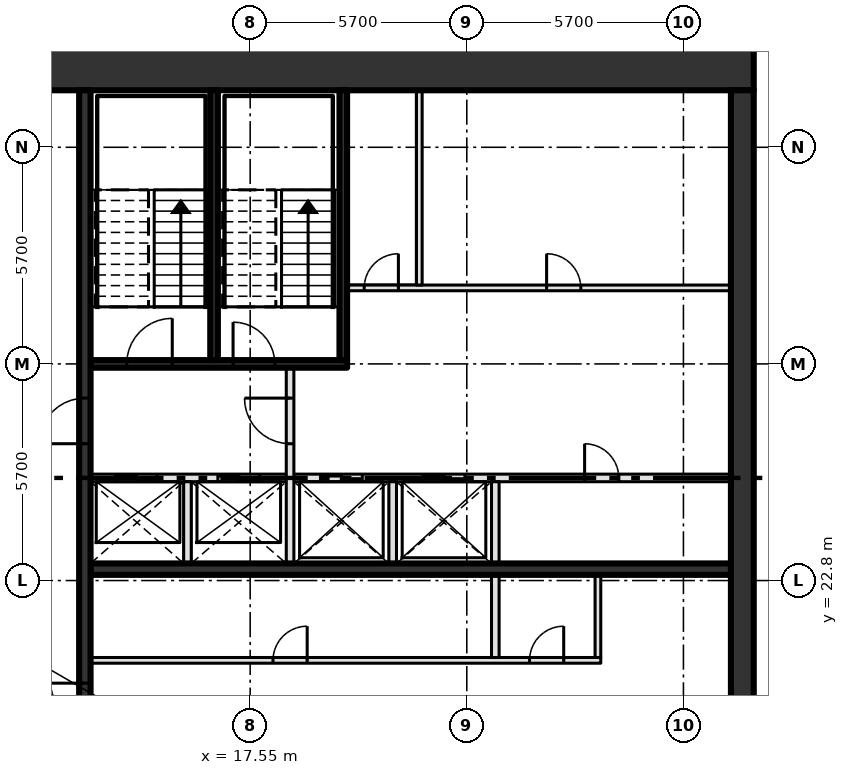
"""IFC4 building model, lengths in metres.
Left out: names, types, materials, properties, quantities, classifications, styles, units other than length and angle.
Written with IfcOpenShell. Run it as: python <this file> out.ifc"""

import sys

from ifc_helpers import new_model, si_unit, direction, frame, frame_2d, origin, place, context, subcontext, project, spatial, rectangle, extrude, element, fill, save


model = new_model("IFC4")
c1 = context("Model", 3, precision=1e-05, world=origin(), true_north=direction((0.0, 1.0)))
c2 = subcontext(c1, "Body", "Model", "MODEL_VIEW")
j1 = project(units=[si_unit("LENGTHUNIT", "METRE"), si_unit("PLANEANGLEUNIT", "RADIAN")], contexts=[c1])
p1 = place(None, origin())
s1 = spatial("IfcSite", under=j1, at=p1, CompositionType="ELEMENT")
p2 = place(p1, origin())
s2 = spatial("IfcBuilding", under=s1, at=p2, CompositionType="ELEMENT")
p3 = place(p2, frame((0.0, 0.0, 340.2)))
s3 = spatial("IfcBuildingStorey", under=s2, at=p3, CompositionType="ELEMENT", Elevation=340.2)
p4 = place(p3, frame((8.0, 36.3, -0.3), z_axis=(0.0, 0.0, 1.0), x_axis=(1.0, 0.0, 0.0)))
e1 = element("IfcWall", 1, at=p4, inside=s3, PredefinedType="SHEAR", context=c2, shape_type="SweptSolid", body=[
    extrude(rectangle(XDim=22.8, YDim=1.2, at=frame_2d((11.4, 0.0))), origin(), (0.0, 0.0, 1.0), 4.2),
])
p5 = place(p4, frame((2.3, 0.0, 0.3)))
e2 = element("IfcOpeningElement", 2, at=p5, cuts=e1, PredefinedType="OPENING", context=c2, shape_type="SweptSolid", body=[
    extrude(rectangle(XDim=1.8, YDim=2.1, at=frame_2d((0.9, 1.05))), frame((0.0, 0.61, 0.0), z_axis=(0.0, -1.0, 0.0), x_axis=(1.0, 0.0, 0.0)), (0.0, 0.0, 1.0), 1.22),
])
p6 = place(p3, frame((30.5, 14.7, -0.3), z_axis=(0.0, 0.0, 1.0), x_axis=(0.0, 1.0, 0.0)))
e3 = element("IfcWall", 3, at=p6, inside=s3, PredefinedType="SHEAR", context=c2, shape_type="SweptSolid", body=[
    extrude(rectangle(XDim=21.0, YDim=0.6, at=frame_2d((10.5, 0.0))), origin(), (0.0, 0.0, 1.0), 4.2),
])
p7 = place(p3, frame((13.35, 20.7, 0.0), z_axis=(0.0, 0.0, 1.0), x_axis=(1.0, 0.0, 0.0)))
e4 = element("IfcWall", 4, at=p7, inside=s3, PredefinedType="PARTITIONING", context=c2, shape_type="SweptSolid", body=[
    extrude(rectangle(XDim=13.425, YDim=0.15, at=frame_2d((6.712, 0.0))), origin(), (0.0, 0.0, 1.0), 3.9),
])
p8 = place(p7, frame((4.8, 0.0, 0.0)))
e5 = element("IfcOpeningElement", 5, at=p8, cuts=e4, PredefinedType="OPENING", context=c2, shape_type="SweptSolid", body=[
    extrude(rectangle(XDim=0.9, YDim=2.1, at=frame_2d((0.45, 1.05))), frame((0.0, 0.085, 0.0), z_axis=(0.0, -1.0, 0.0), x_axis=(1.0, 0.0, 0.0)), (0.0, 0.0, 1.0), 0.17),
])
p9 = place(p7, frame((11.55, 0.0, 0.0)))
e6 = element("IfcOpeningElement", 6, at=p9, cuts=e4, PredefinedType="OPENING", context=c2, shape_type="SweptSolid", body=[
    extrude(rectangle(XDim=0.9, YDim=2.1, at=frame_2d((0.45, 1.05))), frame((0.0, 0.085, 0.0), z_axis=(0.0, -1.0, 0.0), x_axis=(1.0, 0.0, 0.0)), (0.0, 0.0, 1.0), 0.17),
])
p10 = place(p3, frame((13.35, 23.1, 0.0), z_axis=(0.0, 0.0, 1.0), x_axis=(1.0, 0.0, 0.0)))
e7 = element("IfcWall", 7, at=p10, inside=s3, PredefinedType="SHEAR", context=c2, shape_type="SweptSolid", body=[
    extrude(rectangle(XDim=16.85, YDim=0.3, at=frame_2d((8.425, 0.0))), origin(), (0.0, 0.0, 1.0), 3.9),
])
p11 = place(p3, frame((13.35, 25.5, 0.0), z_axis=(0.0, 0.0, 1.0), x_axis=(1.0, 0.0, 0.0)))
e8 = element("IfcWall", 8, at=p11, inside=s3, PredefinedType="SOLIDWALL", context=c2, shape_type="SweptSolid", body=[
    extrude(rectangle(XDim=16.85, YDim=0.2, at=frame_2d((8.425, 0.0))), origin(), (0.0, 0.0, 1.0), 3.9),
])
p12 = place(p11, frame((0.65, 0.0, 0.0)))
e9 = element("IfcOpeningElement", 9, at=p12, cuts=e8, PredefinedType="OPENING", context=c2, shape_type="SweptSolid", body=[
    extrude(rectangle(XDim=1.1, YDim=2.1, at=frame_2d((0.55, 1.05))), frame((0.0, 0.11, 0.0), z_axis=(0.0, -1.0, 0.0), x_axis=(1.0, 0.0, 0.0)), (0.0, 0.0, 1.0), 0.22),
])
p13 = place(p11, frame((3.35, 0.0, 0.0)))
e10 = element("IfcOpeningElement", 10, at=p13, cuts=e8, PredefinedType="OPENING", context=c2, shape_type="SweptSolid", body=[
    extrude(rectangle(XDim=1.1, YDim=2.1, at=frame_2d((0.55, 1.05))), frame((0.0, 0.11, 0.0), z_axis=(0.0, -1.0, 0.0), x_axis=(1.0, 0.0, 0.0)), (0.0, 0.0, 1.0), 0.22),
])
p14 = place(p11, frame((6.05, 0.0, 0.0)))
e11 = element("IfcOpeningElement", 11, at=p14, cuts=e8, PredefinedType="OPENING", context=c2, shape_type="SweptSolid", body=[
    extrude(rectangle(XDim=1.1, YDim=2.1, at=frame_2d((0.55, 1.05))), frame((0.0, 0.11, 0.0), z_axis=(0.0, -1.0, 0.0), x_axis=(1.0, 0.0, 0.0)), (0.0, 0.0, 1.0), 0.22),
])
p15 = place(p11, frame((8.75, 0.0, 0.0)))
e12 = element("IfcOpeningElement", 12, at=p15, cuts=e8, PredefinedType="OPENING", context=c2, shape_type="SweptSolid", body=[
    extrude(rectangle(XDim=1.1, YDim=2.1, at=frame_2d((0.55, 1.05))), frame((0.0, 0.11, 0.0), z_axis=(0.0, -1.0, 0.0), x_axis=(1.0, 0.0, 0.0)), (0.0, 0.0, 1.0), 0.22),
])
p16 = place(p11, frame((13.0, 0.0, 0.0)))
e13 = element("IfcOpeningElement", 13, at=p16, cuts=e8, PredefinedType="OPENING", context=c2, shape_type="SweptSolid", body=[
    extrude(rectangle(XDim=0.9, YDim=2.1, at=frame_2d((0.45, 1.05))), frame((0.0, 0.11, 0.0), z_axis=(0.0, -1.0, 0.0), x_axis=(1.0, 0.0, 0.0)), (0.0, 0.0, 1.0), 0.22),
])
p17 = place(p3, frame((13.35, 28.5, 0.0), z_axis=(0.0, 0.0, 1.0), x_axis=(1.0, 0.0, 0.0)))
e14 = element("IfcWall", 14, at=p17, inside=s3, PredefinedType="SOLIDWALL", context=c2, shape_type="SweptSolid", body=[
    extrude(rectangle(XDim=6.75, YDim=0.2, at=frame_2d((3.375, 0.0))), origin(), (0.0, 0.0, 1.0), 3.9),
])
p18 = place(p17, frame((0.95, 0.0, 0.0)))
e15 = element("IfcOpeningElement", 15, at=p18, cuts=e14, PredefinedType="OPENING", context=c2, shape_type="SweptSolid", body=[
    extrude(rectangle(XDim=1.2, YDim=2.1, at=frame_2d((0.6, 1.05))), frame((0.0, 0.11, 0.0), z_axis=(0.0, -1.0, 0.0), x_axis=(1.0, 0.0, 0.0)), (0.0, 0.0, 1.0), 0.22),
])
p19 = place(p17, frame((3.75, 0.0, 0.0)))
e16 = element("IfcOpeningElement", 16, at=p19, cuts=e14, PredefinedType="OPENING", context=c2, shape_type="SweptSolid", body=[
    extrude(rectangle(XDim=1.1, YDim=2.1, at=frame_2d((0.55, 1.05))), frame((0.0, 0.11, 0.0), z_axis=(0.0, -1.0, 0.0), x_axis=(1.0, 0.0, 0.0)), (0.0, 0.0, 1.0), 0.22),
])
p20 = place(p3, frame((20.1, 30.5, 0.0), z_axis=(0.0, 0.0, 1.0), x_axis=(1.0, 0.0, 0.0)))
e17 = element("IfcWall", 17, at=p20, inside=s3, PredefinedType="PARTITIONING", context=c2, shape_type="SweptSolid", body=[
    extrude(rectangle(XDim=10.1, YDim=0.15, at=frame_2d((5.05, 0.0))), origin(), (0.0, 0.0, 1.0), 3.9),
])
p21 = place(p20, frame((0.45, 0.0, 0.0)))
e18 = element("IfcOpeningElement", 18, at=p21, cuts=e17, PredefinedType="OPENING", context=c2, shape_type="SweptSolid", body=[
    extrude(rectangle(XDim=0.9, YDim=2.1, at=frame_2d((0.45, 1.05))), frame((0.0, 0.085, 0.0), z_axis=(0.0, -1.0, 0.0), x_axis=(1.0, 0.0, 0.0)), (0.0, 0.0, 1.0), 0.17),
])
p22 = place(p20, frame((5.25, 0.0, 0.0)))
e19 = element("IfcOpeningElement", 19, at=p22, cuts=e17, PredefinedType="OPENING", context=c2, shape_type="SweptSolid", body=[
    extrude(rectangle(XDim=0.9, YDim=2.1, at=frame_2d((0.45, 1.05))), frame((0.0, 0.085, 0.0), z_axis=(0.0, -1.0, 0.0), x_axis=(1.0, 0.0, 0.0)), (0.0, 0.0, 1.0), 0.17),
])
p23 = place(p3, frame((13.2, 14.7, 0.0), z_axis=(0.0, 0.0, 1.0), x_axis=(0.0, 1.0, 0.0)))
e20 = element("IfcWall", 20, at=p23, inside=s3, PredefinedType="SHEAR", context=c2, shape_type="SweptSolid", body=[
    extrude(rectangle(XDim=21.0, YDim=0.3, at=frame_2d((10.5, 0.0))), origin(), (0.0, 0.0, 1.0), 3.9),
])
p24 = place(p23, frame((3.6, 0.0, 0.0)))
e21 = element("IfcOpeningElement", 21, at=p24, cuts=e20, PredefinedType="OPENING", context=c2, shape_type="SweptSolid", body=[
    extrude(rectangle(XDim=1.8, YDim=2.1, at=frame_2d((0.9, 1.05))), frame((0.0, 0.16, 0.0), z_axis=(0.0, -1.0, 0.0), x_axis=(1.0, 0.0, 0.0)), (0.0, 0.0, 1.0), 0.32),
])
p25 = place(p23, frame((11.7, 0.0, 0.0)))
e22 = element("IfcOpeningElement", 22, at=p25, cuts=e20, PredefinedType="OPENING", context=c2, shape_type="SweptSolid", body=[
    extrude(rectangle(XDim=1.2, YDim=2.1, at=frame_2d((0.6, 1.05))), frame((0.0, 0.16, 0.0), z_axis=(0.0, -1.0, 0.0), x_axis=(1.0, 0.0, 0.0)), (0.0, 0.0, 1.0), 0.32),
])
p26 = place(p3, frame((15.9, 23.25, 0.0), z_axis=(0.0, 0.0, 1.0), x_axis=(0.0, 1.0, 0.0)))
e23 = element("IfcWall", 23, at=p26, inside=s3, PredefinedType="SOLIDWALL", context=c2, shape_type="SweptSolid", body=[
    extrude(rectangle(XDim=2.15, YDim=0.2, at=frame_2d((1.075, 0.0))), origin(), (0.0, 0.0, 1.0), 3.9),
])
p27 = place(p3, frame((16.6, 28.6, 0.0), z_axis=(0.0, 0.0, 1.0), x_axis=(0.0, 1.0, 0.0)))
e24 = element("IfcWall", 24, at=p27, inside=s3, PredefinedType="SOLIDWALL", context=c2, shape_type="SweptSolid", body=[
    extrude(rectangle(XDim=7.1, YDim=0.2, at=frame_2d((3.55, 0.0))), origin(), (0.0, 0.0, 1.0), 3.9),
])
p28 = place(p3, frame((18.6, 23.25, 0.0), z_axis=(0.0, 0.0, 1.0), x_axis=(0.0, 1.0, 0.0)))
e25 = element("IfcWall", 25, at=p28, inside=s3, PredefinedType="SOLIDWALL", context=c2, shape_type="SweptSolid", body=[
    extrude(rectangle(XDim=5.15, YDim=0.2, at=frame_2d((2.575, 0.0))), origin(), (0.0, 0.0, 1.0), 3.9),
])
p29 = place(p28, frame((3.15, 0.0, 0.0)))
e26 = element("IfcOpeningElement", 26, at=p29, cuts=e25, PredefinedType="OPENING", context=c2, shape_type="SweptSolid", body=[
    extrude(rectangle(XDim=1.2, YDim=2.1, at=frame_2d((0.6, 1.05))), frame((0.0, 0.11, 0.0), z_axis=(0.0, -1.0, 0.0), x_axis=(1.0, 0.0, 0.0)), (0.0, 0.0, 1.0), 0.22),
])
p30 = place(p3, frame((20.0, 28.6, 0.0), z_axis=(0.0, 0.0, 1.0), x_axis=(0.0, 1.0, 0.0)))
e27 = element("IfcWall", 27, at=p30, inside=s3, PredefinedType="SOLIDWALL", context=c2, shape_type="SweptSolid", body=[
    extrude(rectangle(XDim=7.1, YDim=0.2, at=frame_2d((3.55, 0.0))), origin(), (0.0, 0.0, 1.0), 3.9),
])
p31 = place(p3, frame((21.3, 23.25, 0.0), z_axis=(0.0, 0.0, 1.0), x_axis=(0.0, 1.0, 0.0)))
e28 = element("IfcWall", 28, at=p31, inside=s3, PredefinedType="SOLIDWALL", context=c2, shape_type="SweptSolid", body=[
    extrude(rectangle(XDim=2.15, YDim=0.2, at=frame_2d((1.075, 0.0))), origin(), (0.0, 0.0, 1.0), 3.9),
])
p32 = place(p3, frame((22.0, 30.575, 0.0), z_axis=(0.0, 0.0, 1.0), x_axis=(0.0, 1.0, 0.0)))
e29 = element("IfcWall", 29, at=p32, inside=s3, PredefinedType="PARTITIONING", context=c2, shape_type="SweptSolid", body=[
    extrude(rectangle(XDim=5.125, YDim=0.15, at=frame_2d((2.562, 0.0))), origin(), (0.0, 0.0, 1.0), 3.9),
])
p33 = place(p3, frame((24.0, 20.775, 0.0), z_axis=(0.0, 0.0, 1.0), x_axis=(0.0, 1.0, 0.0)))
e30 = element("IfcWall", 30, at=p33, inside=s3, PredefinedType="SOLIDWALL", context=c2, shape_type="SweptSolid", body=[
    extrude(rectangle(XDim=4.625, YDim=0.2, at=frame_2d((2.312, 0.0))), origin(), (0.0, 0.0, 1.0), 3.9),
])
p34 = place(p3, frame((26.7, 20.775, 0.0), z_axis=(0.0, 0.0, 1.0), x_axis=(0.0, 1.0, 0.0)))
e31 = element("IfcWall", 31, at=p34, inside=s3, PredefinedType="PARTITIONING", context=c2, shape_type="SweptSolid", body=[
    extrude(rectangle(XDim=2.175, YDim=0.15, at=frame_2d((1.087, 0.0))), origin(), (0.0, 0.0, 1.0), 3.9),
])
p35 = place(p12, origin())
e32 = element("IfcDoor", 32, at=p35, inside=s3, OperationType="SLIDING_TO_LEFT", PredefinedType="DOOR", context=c2, shape_type="SweptSolid", body=[
    extrude(rectangle(XDim=1.1, YDim=2.1, at=frame_2d((0.55, 1.05))), frame((0.0, 0.025, 0.0), z_axis=(0.0, -1.0, 0.0), x_axis=(1.0, 0.0, 0.0)), (0.0, 0.0, 1.0), 0.05),
])
fill(e9, e32)
p36 = place(p13, origin())
e33 = element("IfcDoor", 33, at=p36, inside=s3, OperationType="SLIDING_TO_LEFT", PredefinedType="DOOR", context=c2, shape_type="SweptSolid", body=[
    extrude(rectangle(XDim=1.1, YDim=2.1, at=frame_2d((0.55, 1.05))), frame((0.0, 0.025, 0.0), z_axis=(0.0, -1.0, 0.0), x_axis=(1.0, 0.0, 0.0)), (0.0, 0.0, 1.0), 0.05),
])
fill(e10, e33)
p37 = place(p14, origin())
e34 = element("IfcDoor", 34, at=p37, inside=s3, OperationType="SLIDING_TO_LEFT", PredefinedType="DOOR", context=c2, shape_type="SweptSolid", body=[
    extrude(rectangle(XDim=1.1, YDim=2.1, at=frame_2d((0.55, 1.05))), frame((0.0, 0.025, 0.0), z_axis=(0.0, -1.0, 0.0), x_axis=(1.0, 0.0, 0.0)), (0.0, 0.0, 1.0), 0.05),
])
fill(e11, e34)
p38 = place(p15, origin())
e35 = element("IfcDoor", 35, at=p38, inside=s3, OperationType="SLIDING_TO_LEFT", PredefinedType="DOOR", context=c2, shape_type="SweptSolid", body=[
    extrude(rectangle(XDim=1.1, YDim=2.1, at=frame_2d((0.55, 1.05))), frame((0.0, 0.025, 0.0), z_axis=(0.0, -1.0, 0.0), x_axis=(1.0, 0.0, 0.0)), (0.0, 0.0, 1.0), 0.05),
])
fill(e12, e35)
p39 = place(p8, origin())
e36 = element("IfcDoor", 36, at=p39, inside=s3, OperationType="SINGLE_SWING_RIGHT", PredefinedType="DOOR", context=c2, shape_type="SweptSolid", body=[
    extrude(rectangle(XDim=0.9, YDim=2.1, at=frame_2d((0.45, 1.05))), frame((0.0, 0.025, 0.0), z_axis=(0.0, -1.0, 0.0), x_axis=(1.0, 0.0, 0.0)), (0.0, 0.0, 1.0), 0.05),
])
fill(e5, e36)
p40 = place(p9, origin())
e37 = element("IfcDoor", 37, at=p40, inside=s3, OperationType="SINGLE_SWING_RIGHT", PredefinedType="DOOR", context=c2, shape_type="SweptSolid", body=[
    extrude(rectangle(XDim=0.9, YDim=2.1, at=frame_2d((0.45, 1.05))), frame((0.0, 0.025, 0.0), z_axis=(0.0, -1.0, 0.0), x_axis=(1.0, 0.0, 0.0)), (0.0, 0.0, 1.0), 0.05),
])
fill(e6, e37)
p41 = place(p16, origin())
e38 = element("IfcDoor", 38, at=p41, inside=s3, OperationType="SINGLE_SWING_LEFT", PredefinedType="DOOR", context=c2, shape_type="SweptSolid", body=[
    extrude(rectangle(XDim=0.9, YDim=2.1, at=frame_2d((0.45, 1.05))), frame((0.0, 0.025, 0.0), z_axis=(0.0, -1.0, 0.0), x_axis=(1.0, 0.0, 0.0)), (0.0, 0.0, 1.0), 0.05),
])
fill(e13, e38)
p42 = place(p21, origin())
e39 = element("IfcDoor", 39, at=p42, inside=s3, OperationType="SINGLE_SWING_RIGHT", PredefinedType="DOOR", context=c2, shape_type="SweptSolid", body=[
    extrude(rectangle(XDim=0.9, YDim=2.1, at=frame_2d((0.45, 1.05))), frame((0.0, 0.025, 0.0), z_axis=(0.0, -1.0, 0.0), x_axis=(1.0, 0.0, 0.0)), (0.0, 0.0, 1.0), 0.05),
])
fill(e18, e39)
p43 = place(p22, origin())
e40 = element("IfcDoor", 40, at=p43, inside=s3, OperationType="SINGLE_SWING_LEFT", PredefinedType="DOOR", context=c2, shape_type="SweptSolid", body=[
    extrude(rectangle(XDim=0.9, YDim=2.1, at=frame_2d((0.45, 1.05))), frame((0.0, 0.025, 0.0), z_axis=(0.0, -1.0, 0.0), x_axis=(1.0, 0.0, 0.0)), (0.0, 0.0, 1.0), 0.05),
])
fill(e19, e40)
p44 = place(p18, origin())
e41 = element("IfcDoor", 41, at=p44, inside=s3, OperationType="SINGLE_SWING_RIGHT", PredefinedType="DOOR", context=c2, shape_type="SweptSolid", body=[
    extrude(rectangle(XDim=1.2, YDim=2.1, at=frame_2d((0.6, 1.05))), frame((0.0, 0.025, 0.0), z_axis=(0.0, -1.0, 0.0), x_axis=(1.0, 0.0, 0.0)), (0.0, 0.0, 1.0), 0.05),
])
fill(e15, e41)
p45 = place(p19, origin())
e42 = element("IfcDoor", 42, at=p45, inside=s3, OperationType="SINGLE_SWING_LEFT", PredefinedType="DOOR", context=c2, shape_type="SweptSolid", body=[
    extrude(rectangle(XDim=1.1, YDim=2.1, at=frame_2d((0.55, 1.05))), frame((0.0, 0.025, 0.0), z_axis=(0.0, -1.0, 0.0), x_axis=(1.0, 0.0, 0.0)), (0.0, 0.0, 1.0), 0.05),
])
fill(e16, e42)
p46 = place(p24, origin())
e43 = element("IfcDoor", 43, at=p46, inside=s3, OperationType="DOUBLE_DOOR_SINGLE_SWING", PredefinedType="DOOR", context=c2, shape_type="SweptSolid", body=[
    extrude(rectangle(XDim=1.8, YDim=2.1, at=frame_2d((0.9, 1.05))), frame((0.0, 0.025, 0.0), z_axis=(0.0, -1.0, 0.0), x_axis=(1.0, 0.0, 0.0)), (0.0, 0.0, 1.0), 0.05),
])
fill(e21, e43)
p47 = place(p25, origin())
e44 = element("IfcDoor", 44, at=p47, inside=s3, OperationType="SINGLE_SWING_LEFT", PredefinedType="DOOR", context=c2, shape_type="SweptSolid", body=[
    extrude(rectangle(XDim=1.2, YDim=2.1, at=frame_2d((0.6, 1.05))), frame((0.0, 0.025, 0.0), z_axis=(0.0, -1.0, 0.0), x_axis=(1.0, 0.0, 0.0)), (0.0, 0.0, 1.0), 0.05),
])
fill(e22, e44)
p48 = place(p29, origin())
e45 = element("IfcDoor", 45, at=p48, inside=s3, OperationType="SINGLE_SWING_RIGHT", PredefinedType="DOOR", context=c2, shape_type="SweptSolid", body=[
    extrude(rectangle(XDim=1.2, YDim=2.1, at=frame_2d((0.6, 1.05))), frame((0.0, 0.025, 0.0), z_axis=(0.0, -1.0, 0.0), x_axis=(1.0, 0.0, 0.0)), (0.0, 0.0, 1.0), 0.05),
])
fill(e26, e45)
save(model, sys.argv[1])
